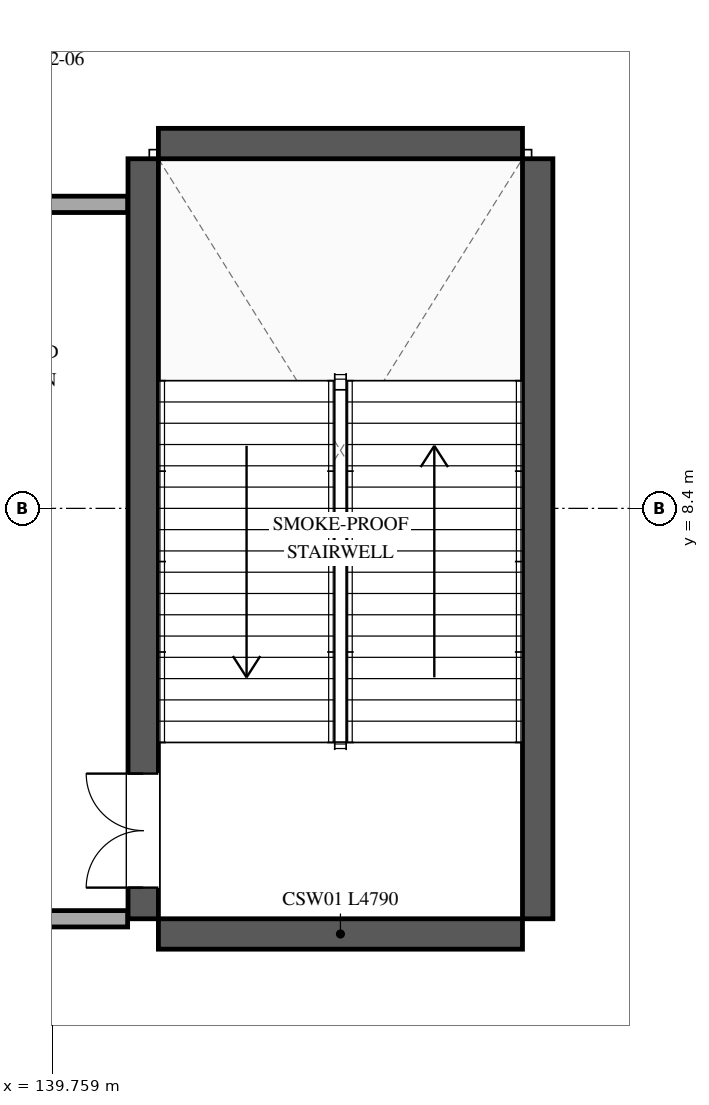
"""IFC4 building model, lengths in metres.
Left out: names, types, materials, properties, quantities, classifications, styles, units other than length and angle.
Written with IfcOpenShell. Run it as: python <this file> out.ifc"""

import sys

from ifc_helpers import new_model, si_unit, direction, frame, frame_2d, origin, place, context, subcontext, project, spatial, rectangle, extrude, element, fill, save


model = new_model("IFC4")
c1 = context("Model", 3, precision=1e-05, world=origin(), true_north=direction((0.0, 1.0)))
c2 = subcontext(c1, "Body", "Model", "MODEL_VIEW")
j1 = project(units=[si_unit("LENGTHUNIT", "METRE"), si_unit("PLANEANGLEUNIT", "RADIAN")], contexts=[c1])
p1 = place(None, origin())
s1 = spatial("IfcSite", under=j1, at=p1, CompositionType="ELEMENT")
p2 = place(p1, origin())
s2 = spatial("IfcBuilding", under=s1, at=p2, CompositionType="ELEMENT")
p3 = place(p2, frame((0.0, 0.0, 6.0)))
s3 = spatial("IfcBuildingStorey", under=s2, at=p3, CompositionType="ELEMENT", Elevation=6.0)
p4 = place(p3, frame((140.955, 3.0, 0.0), z_axis=(0.0, 0.0, 1.0), x_axis=(0.0, 1.0, 0.0)))
e1 = element("IfcWall", 1, at=p4, inside=s3, PredefinedType="SHEAR", context=c2, shape_type="SweptSolid", body=[
    extrude(rectangle(XDim=10.0, YDim=0.4, at=frame_2d((5.0, 0.0))), origin(), (0.0, 0.0, 1.0), 5.4),
])
p5 = place(p4, frame((0.41, 0.0, 0.0)))
e2 = element("IfcOpeningElement", 2, at=p5, cuts=e1, PredefinedType="OPENING", context=c2, shape_type="SweptSolid", body=[
    extrude(rectangle(XDim=1.5, YDim=2.2, at=frame_2d((0.75, 1.1))), frame((0.0, 0.21, 0.0), z_axis=(0.0, -1.0, 0.0), x_axis=(1.0, 0.0, 0.0)), (0.0, 0.0, 1.0), 0.42),
])
p6 = place(p3, frame((146.145, 13.0, 0.0), z_axis=(0.0, 0.0, 1.0), x_axis=(0.0, -1.0, 0.0)))
e3 = element("IfcWall", 3, at=p6, inside=s3, PredefinedType="SHEAR", context=c2, shape_type="SweptSolid", body=[
    extrude(rectangle(XDim=10.0, YDim=0.4, at=frame_2d((5.0, 0.0))), origin(), (0.0, 0.0, 1.0), 5.4),
])
for number, where, z_axis, x_axis in (
    (4, (145.945, 2.8, 0.0), (0.0, 0.0, 1.0), (-1.0, 0.0, 0.0)),
    (5, (141.155, 13.2, 0.0), (0.0, 0.0, 1.0), (1.0, 0.0, 0.0)),
):
    element("IfcWall", number, at=place(p3, frame(where, z_axis=z_axis, x_axis=x_axis)), inside=s3, PredefinedType="SHEAR", context=c2, shape_type="SweptSolid", body=[
        extrude(rectangle(XDim=4.79, YDim=0.4, at=frame_2d((2.395, 0.0))), origin(), (0.0, 0.0, 1.0), 5.4),
    ])
p7 = place(p3, frame((121.8, 12.4, 0.0), z_axis=(0.0, 0.0, 1.0), x_axis=(1.0, 0.0, 0.0)))
e6 = element("IfcWall", 6, at=p7, inside=s3, PredefinedType="PARTITIONING", context=c2, shape_type="SweptSolid", body=[
    extrude(rectangle(XDim=18.95, YDim=0.215, at=frame_2d((9.475, 0.0))), origin(), (0.0, 0.0, 1.0), 4.295),
])
p8 = place(p7, frame((8.8, 0.0, 0.0)))
e7 = element("IfcOpeningElement", 7, at=p8, cuts=e6, PredefinedType="OPENING", context=c2, shape_type="SweptSolid", body=[
    extrude(rectangle(XDim=1.35, YDim=2.2, at=frame_2d((0.675, 1.1))), frame((0.0, 0.118, 0.0), z_axis=(0.0, -1.0, 0.0), x_axis=(1.0, 0.0, 0.0)), (0.0, 0.0, 1.0), 0.235),
])
p9 = place(p3, frame((140.75, 3.0, 0.0), z_axis=(0.0, 0.0, 1.0), x_axis=(-1.0, 0.0, 0.0)))
e8 = element("IfcWall", 8, at=p9, inside=s3, PredefinedType="PARTITIONING", context=c2, shape_type="SweptSolid", body=[
    extrude(rectangle(XDim=4.35, YDim=0.215, at=frame_2d((2.175, 0.0))), origin(), (0.0, 0.0, 1.0), 4.295),
])
p10 = place(p5, origin())
e9 = element("IfcDoor", 9, at=p10, inside=s3, OperationType="DOUBLE_DOOR_SINGLE_SWING", PredefinedType="DOOR", context=c2, shape_type="SweptSolid", body=[
    extrude(rectangle(XDim=1.5, YDim=2.2, at=frame_2d((0.75, 1.1))), frame((0.0, 0.025, 0.0), z_axis=(0.0, -1.0, 0.0), x_axis=(1.0, 0.0, 0.0)), (0.0, 0.0, 1.0), 0.05),
])
fill(e2, e9)
save(model, sys.argv[1])
